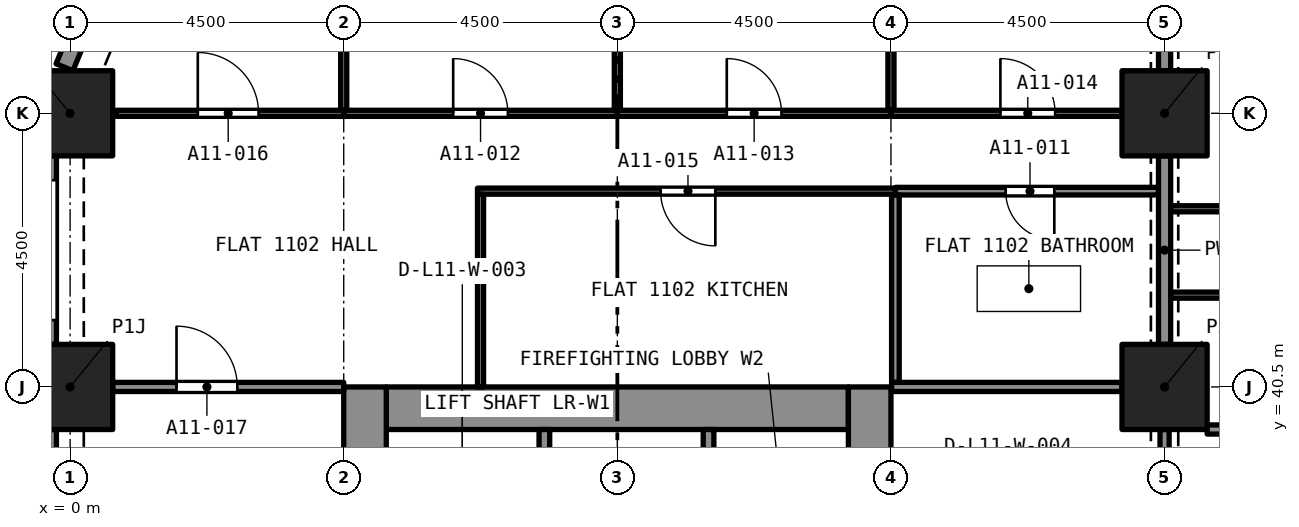
"""IFC4 building model, lengths in metres.
Left out: names, types, materials, properties, quantities, classifications, styles, units other than length and angle.
Written with IfcOpenShell. Run it as: python <this file> out.ifc"""

import sys

from ifc_helpers import new_model, si_unit, direction, frame, frame_2d, origin, origin_2d, place, context, subcontext, project, spatial, rectangle, extrude, element, fill, save


model = new_model("IFC4")
c1 = context("Model", 3, precision=1e-05, world=origin(), true_north=direction((0.0, 1.0)))
c2 = subcontext(c1, "Body", "Model", "MODEL_VIEW")
j1 = project(units=[si_unit("LENGTHUNIT", "METRE"), si_unit("PLANEANGLEUNIT", "RADIAN")], contexts=[c1])
p1 = place(None, origin())
s1 = spatial("IfcSite", under=j1, at=p1, CompositionType="ELEMENT")
p2 = place(p1, origin())
s2 = spatial("IfcBuilding", under=s1, at=p2, CompositionType="ELEMENT")
p3 = place(p2, frame((0.0, 0.0, 46.4)))
s3 = spatial("IfcBuildingStorey", under=s2, at=p3, CompositionType="ELEMENT", Elevation=46.4)
for number, where, z_axis, x_axis in (
    (1, (0.0, 40.5, 0.0), (0.0, 0.0, 1.0), (1.0, 0.0, 0.0)),
    (2, (18.0, 40.5, 0.0), (0.0, 0.0, 1.0), (1.0, 0.0, 0.0)),
    (3, (0.0, 45.0, 0.0), (0.0, 0.0, 1.0), (1.0, 0.0, 0.0)),
    (4, (18.0, 45.0, 0.0), (0.0, 0.0, 1.0), (1.0, 0.0, 0.0)),
):
    element("IfcColumn", number, at=place(p3, frame(where, z_axis=z_axis, x_axis=x_axis)), inside=s3, PredefinedType="COLUMN", context=c2, shape_type="SweptSolid", body=[
        extrude(rectangle(XDim=1.4, YDim=1.4, at=origin_2d()), origin(), (0.0, 0.0, 1.0), 3.2),
    ])
p4 = place(p3, frame((5.2, 40.15, 0.0), z_axis=(0.0, 0.0, 1.0), x_axis=(1.0, 0.0, 0.0)))
e5 = element("IfcWall", 5, at=p4, inside=s3, PredefinedType="SOLIDWALL", context=c2, shape_type="SweptSolid", body=[
    extrude(rectangle(XDim=7.6, YDim=0.7, at=frame_2d((3.8, 0.0))), origin(), (0.0, 0.0, 1.0), 3.2),
])
p5 = place(p3, frame((4.85, 27.0, 0.0), z_axis=(0.0, 0.0, 1.0), x_axis=(0.0, 1.0, 0.0)))
e6 = element("IfcWall", 6, at=p5, inside=s3, PredefinedType="SOLIDWALL", context=c2, shape_type="SweptSolid", body=[
    extrude(rectangle(XDim=13.5, YDim=0.7, at=frame_2d((6.75, 0.0))), origin(), (0.0, 0.0, 1.0), 3.2),
])
p6 = place(p5, frame((8.95, 0.0, 0.0)))
e7 = element("IfcOpeningElement", 7, at=p6, cuts=e6, PredefinedType="OPENING", context=c2, shape_type="SweptSolid", body=[
    extrude(rectangle(XDim=1.2, YDim=2.1, at=frame_2d((0.6, 1.05))), frame((0.0, 0.36, 0.0), z_axis=(0.0, -1.0, 0.0), x_axis=(1.0, 0.0, 0.0)), (0.0, 0.0, 1.0), 0.72),
])
p7 = place(p3, frame((13.15, 27.0, 0.0), z_axis=(0.0, 0.0, 1.0), x_axis=(0.0, 1.0, 0.0)))
e8 = element("IfcWall", 8, at=p7, inside=s3, PredefinedType="SOLIDWALL", context=c2, shape_type="SweptSolid", body=[
    extrude(rectangle(XDim=13.5, YDim=0.7, at=frame_2d((6.75, 0.0))), origin(), (0.0, 0.0, 1.0), 3.2),
])
p8 = place(p7, frame((11.1, 0.0, 0.0)))
e9 = element("IfcOpeningElement", 9, at=p8, cuts=e8, PredefinedType="OPENING", context=c2, shape_type="SweptSolid", body=[
    extrude(rectangle(XDim=1.1, YDim=2.1, at=frame_2d((0.55, 1.05))), frame((0.0, 0.36, 0.0), z_axis=(0.0, -1.0, 0.0), x_axis=(1.0, 0.0, 0.0)), (0.0, 0.0, 1.0), 0.72),
])
p9 = place(p7, frame((8.95, 0.0, 0.0)))
e10 = element("IfcOpeningElement", 10, at=p9, cuts=e8, PredefinedType="OPENING", context=c2, shape_type="SweptSolid", body=[
    extrude(rectangle(XDim=1.2, YDim=2.1, at=frame_2d((0.6, 1.05))), frame((0.0, 0.36, 0.0), z_axis=(0.0, -1.0, 0.0), x_axis=(1.0, 0.0, 0.0)), (0.0, 0.0, 1.0), 0.72),
])
p10 = place(p3, frame((-0.092, 45.757, 0.0), z_axis=(0.0, 0.0, 1.0), x_axis=(0.382737135771, 0.923857286003, 0.0)))
e11 = element("IfcWall", 11, at=p10, inside=s3, PredefinedType="SOLIDWALL", context=c2, shape_type="SweptSolid", body=[
    extrude(rectangle(XDim=1.865, YDim=0.3, at=frame_2d((0.933, 0.0))), origin(), (0.0, 0.0, 1.0), 3.2),
])
p11 = place(p10, frame((0.508, 0.0, 0.45)))
e12 = element("IfcOpeningElement", 12, at=p11, cuts=e11, PredefinedType="OPENING", context=c2, shape_type="SweptSolid", body=[
    extrude(rectangle(XDim=1.1, YDim=1.95, at=frame_2d((0.55, 0.975))), frame((0.0, 0.16, 0.0), z_axis=(0.0, -1.0, 0.0), x_axis=(1.0, 0.0, 0.0)), (0.0, 0.0, 1.0), 0.32),
])
p12 = place(p3, frame((-0.375, 41.2, 0.0), z_axis=(0.0, 0.0, 1.0), x_axis=(0.0, 1.0, 0.0)))
e13 = element("IfcWall", 13, at=p12, inside=s3, PredefinedType="SOLIDWALL", context=c2, shape_type="SweptSolid", body=[
    extrude(rectangle(XDim=3.1, YDim=0.3, at=frame_2d((1.55, 0.0))), origin(), (0.0, 0.0, 1.0), 3.2),
])
p13 = place(p12, frame((0.4, 0.0, 0.45)))
e14 = element("IfcOpeningElement", 14, at=p13, cuts=e13, PredefinedType="OPENING", context=c2, shape_type="SweptSolid", body=[
    extrude(rectangle(XDim=2.3, YDim=1.95, at=frame_2d((1.15, 0.975))), frame((0.0, 0.16, 0.0), z_axis=(0.0, -1.0, 0.0), x_axis=(1.0, 0.0, 0.0)), (0.0, 0.0, 1.0), 0.32),
])
p14 = place(p3, frame((-0.375, 36.7, 0.0), z_axis=(0.0, 0.0, 1.0), x_axis=(0.0, 1.0, 0.0)))
e15 = element("IfcWall", 15, at=p14, inside=s3, PredefinedType="SOLIDWALL", context=c2, shape_type="SweptSolid", body=[
    extrude(rectangle(XDim=3.1, YDim=0.3, at=frame_2d((1.55, 0.0))), origin(), (0.0, 0.0, 1.0), 3.2),
])
p15 = place(p14, frame((0.4, 0.0, 0.45)))
e16 = element("IfcOpeningElement", 16, at=p15, cuts=e15, PredefinedType="OPENING", context=c2, shape_type="SweptSolid", body=[
    extrude(rectangle(XDim=2.3, YDim=1.95, at=frame_2d((1.15, 0.975))), frame((0.0, 0.16, 0.0), z_axis=(0.0, -1.0, 0.0), x_axis=(1.0, 0.0, 0.0)), (0.0, 0.0, 1.0), 0.32),
])
p16 = place(p3, frame((17.9, 43.72, 0.0), z_axis=(0.0, 0.0, 1.0), x_axis=(-1.0, 0.0, 0.0)))
e17 = element("IfcWall", 17, at=p16, inside=s3, PredefinedType="PARTITIONING", context=c2, shape_type="SweptSolid", body=[
    extrude(rectangle(XDim=4.327, YDim=0.125, at=frame_2d((2.163, 0.0))), origin(), (0.0, 0.0, 1.0), 2.9),
])
p17 = place(p16, frame((1.713, 0.0, 0.0)))
e18 = element("IfcOpeningElement", 18, at=p17, cuts=e17, PredefinedType="OPENING", context=c2, shape_type="SweptSolid", body=[
    extrude(rectangle(XDim=0.8, YDim=2.1, at=frame_2d((0.4, 1.05))), frame((0.0, 0.073, 0.0), z_axis=(0.0, -1.0, 0.0), x_axis=(1.0, 0.0, 0.0)), (0.0, 0.0, 1.0), 0.145),
])
p18 = place(p3, frame((13.573, 40.575, 0.0), z_axis=(0.0, 0.0, 1.0), x_axis=(0.0, 1.0, 0.0)))
e19 = element("IfcWall", 19, at=p18, inside=s3, PredefinedType="PARTITIONING", context=c2, shape_type="SweptSolid", body=[
    extrude(rectangle(XDim=3.083, YDim=0.125, at=frame_2d((1.541, 0.0))), origin(), (0.0, 0.0, 1.0), 2.9),
])
p19 = place(p3, frame((18.0, 41.2, 0.0), z_axis=(0.0, 0.0, 1.0), x_axis=(0.0, 1.0, 0.0)))
e20 = element("IfcWall", 20, at=p19, inside=s3, PredefinedType="PARTITIONING", context=c2, shape_type="SweptSolid", body=[
    extrude(rectangle(XDim=3.1, YDim=0.2, at=frame_2d((1.55, 0.0))), origin(), (0.0, 0.0, 1.0), 2.38),
])
p20 = place(p3, frame((13.511, 40.5, 0.0), z_axis=(0.0, 0.0, 1.0), x_axis=(1.0, 0.0, 0.0)))
e21 = element("IfcWall", 21, at=p20, inside=s3, PredefinedType="PARTITIONING", context=c2, shape_type="SweptSolid", body=[
    extrude(rectangle(XDim=3.789, YDim=0.15, at=frame_2d((1.895, 0.0))), origin(), (0.0, 0.0, 1.0), 2.9),
])
p21 = place(p3, frame((9.0, 45.05, 0.0), z_axis=(0.0, 0.0, 1.0), x_axis=(0.0, 1.0, 0.0)))
e22 = element("IfcWall", 22, at=p21, inside=s3, PredefinedType="PARTITIONING", context=c2, shape_type="SweptSolid", body=[
    extrude(rectangle(XDim=3.75, YDim=0.1, at=frame_2d((1.875, 0.0))), origin(), (0.0, 0.0, 1.0), 2.9),
])
p22 = place(p3, frame((4.5, 45.0, 0.0), z_axis=(0.0, 0.0, 1.0), x_axis=(1.0, 0.0, 0.0)))
e23 = element("IfcWall", 23, at=p22, inside=s3, PredefinedType="PARTITIONING", context=c2, shape_type="SweptSolid", body=[
    extrude(rectangle(XDim=4.5, YDim=0.1, at=frame_2d((2.25, 0.0))), origin(), (0.0, 0.0, 1.0), 2.9),
])
p23 = place(p22, frame((1.8, 0.0, 0.0)))
e24 = element("IfcOpeningElement", 24, at=p23, cuts=e23, PredefinedType="OPENING", context=c2, shape_type="SweptSolid", body=[
    extrude(rectangle(XDim=0.9, YDim=2.1, at=frame_2d((0.45, 1.05))), frame((0.0, 0.06, 0.0), z_axis=(0.0, -1.0, 0.0), x_axis=(1.0, 0.0, 0.0)), (0.0, 0.0, 1.0), 0.12),
])
p24 = place(p3, frame((4.5, 45.05, 0.0), z_axis=(0.0, 0.0, 1.0), x_axis=(0.0, 1.0, 0.0)))
e25 = element("IfcWall", 25, at=p24, inside=s3, PredefinedType="PARTITIONING", context=c2, shape_type="SweptSolid", body=[
    extrude(rectangle(XDim=3.692, YDim=0.1, at=frame_2d((1.846, 0.0))), origin(), (0.0, 0.0, 1.0), 2.9),
])
p25 = place(p3, frame((13.5, 45.05, 0.0), z_axis=(0.0, 0.0, 1.0), x_axis=(0.0, 1.0, 0.0)))
e26 = element("IfcWall", 26, at=p25, inside=s3, PredefinedType="PARTITIONING", context=c2, shape_type="SweptSolid", body=[
    extrude(rectangle(XDim=3.75, YDim=0.1, at=frame_2d((1.875, 0.0))), origin(), (0.0, 0.0, 1.0), 2.9),
])
p26 = place(p3, frame((9.0, 45.0, 0.0), z_axis=(0.0, 0.0, 1.0), x_axis=(1.0, 0.0, 0.0)))
e27 = element("IfcWall", 27, at=p26, inside=s3, PredefinedType="PARTITIONING", context=c2, shape_type="SweptSolid", body=[
    extrude(rectangle(XDim=4.5, YDim=0.1, at=frame_2d((2.25, 0.0))), origin(), (0.0, 0.0, 1.0), 2.9),
])
p27 = place(p26, frame((1.8, 0.0, 0.0)))
e28 = element("IfcOpeningElement", 28, at=p27, cuts=e27, PredefinedType="OPENING", context=c2, shape_type="SweptSolid", body=[
    extrude(rectangle(XDim=0.9, YDim=2.1, at=frame_2d((0.45, 1.05))), frame((0.0, 0.06, 0.0), z_axis=(0.0, -1.0, 0.0), x_axis=(1.0, 0.0, 0.0)), (0.0, 0.0, 1.0), 0.12),
])
p28 = place(p3, frame((13.5, 45.0, 0.0), z_axis=(0.0, 0.0, 1.0), x_axis=(1.0, 0.0, 0.0)))
e29 = element("IfcWall", 29, at=p28, inside=s3, PredefinedType="PARTITIONING", context=c2, shape_type="SweptSolid", body=[
    extrude(rectangle(XDim=3.8, YDim=0.1, at=frame_2d((1.9, 0.0))), origin(), (0.0, 0.0, 1.0), 2.9),
])
p29 = place(p28, frame((1.8, 0.0, 0.0)))
e30 = element("IfcOpeningElement", 30, at=p29, cuts=e29, PredefinedType="OPENING", context=c2, shape_type="SweptSolid", body=[
    extrude(rectangle(XDim=0.9, YDim=2.1, at=frame_2d((0.45, 1.05))), frame((0.0, 0.06, 0.0), z_axis=(0.0, -1.0, 0.0), x_axis=(1.0, 0.0, 0.0)), (0.0, 0.0, 1.0), 0.12),
])
p30 = place(p3, frame((18.0, 45.7, 0.0), z_axis=(0.0, 0.0, 1.0), x_axis=(0.0, 1.0, 0.0)))
e31 = element("IfcWall", 31, at=p30, inside=s3, PredefinedType="PARTITIONING", context=c2, shape_type="SweptSolid", body=[
    extrude(rectangle(XDim=3.1, YDim=0.2, at=frame_2d((1.55, 0.0))), origin(), (0.0, 0.0, 1.0), 2.38),
])
p31 = place(p3, frame((13.573, 43.72, 0.0), z_axis=(0.0, 0.0, 1.0), x_axis=(-1.0, 0.0, 0.0)))
e32 = element("IfcWall", 32, at=p31, inside=s3, PredefinedType="PARTITIONING", context=c2, shape_type="SweptSolid", body=[
    extrude(rectangle(XDim=6.873, YDim=0.1, at=frame_2d((3.437, 0.0))), origin(), (0.0, 0.0, 1.0), 2.9),
])
p32 = place(p31, frame((2.962, 0.0, 0.0)))
e33 = element("IfcOpeningElement", 33, at=p32, cuts=e32, PredefinedType="OPENING", context=c2, shape_type="SweptSolid", body=[
    extrude(rectangle(XDim=0.9, YDim=2.1, at=frame_2d((0.45, 1.05))), frame((0.0, 0.06, 0.0), z_axis=(0.0, -1.0, 0.0), x_axis=(1.0, 0.0, 0.0)), (0.0, 0.0, 1.0), 0.12),
])
p33 = place(p3, frame((6.75, 40.5, 0.0), z_axis=(0.0, 0.0, 1.0), x_axis=(0.0, 1.0, 0.0)))
e34 = element("IfcWall", 34, at=p33, inside=s3, PredefinedType="PARTITIONING", context=c2, shape_type="SweptSolid", body=[
    extrude(rectangle(XDim=3.17, YDim=0.1, at=frame_2d((1.585, 0.0))), origin(), (0.0, 0.0, 1.0), 2.9),
])
p34 = place(p3, frame((0.758, 45.0, 0.0), z_axis=(0.0, 0.0, 1.0), x_axis=(1.0, 0.0, 0.0)))
e35 = element("IfcWall", 35, at=p34, inside=s3, PredefinedType="PARTITIONING", context=c2, shape_type="SweptSolid", body=[
    extrude(rectangle(XDim=3.742, YDim=0.1, at=frame_2d((1.871, 0.0))), origin(), (0.0, 0.0, 1.0), 2.9),
])
p35 = place(p34, frame((1.342, 0.0, 0.0)))
e36 = element("IfcOpeningElement", 36, at=p35, cuts=e35, PredefinedType="OPENING", context=c2, shape_type="SweptSolid", body=[
    extrude(rectangle(XDim=1.0, YDim=2.1, at=frame_2d((0.5, 1.05))), frame((0.0, 0.06, 0.0), z_axis=(0.0, -1.0, 0.0), x_axis=(1.0, 0.0, 0.0)), (0.0, 0.0, 1.0), 0.12),
])
p36 = place(p3, frame((0.7, 40.5, 0.0), z_axis=(0.0, 0.0, 1.0), x_axis=(1.0, 0.0, 0.0)))
e37 = element("IfcWall", 37, at=p36, inside=s3, PredefinedType="PARTITIONING", context=c2, shape_type="SweptSolid", body=[
    extrude(rectangle(XDim=3.8, YDim=0.15, at=frame_2d((1.9, 0.0))), origin(), (0.0, 0.0, 1.0), 2.9),
])
p37 = place(p36, frame((1.05, 0.0, 0.0)))
e38 = element("IfcOpeningElement", 38, at=p37, cuts=e37, PredefinedType="OPENING", context=c2, shape_type="SweptSolid", body=[
    extrude(rectangle(XDim=1.0, YDim=2.1, at=frame_2d((0.5, 1.05))), frame((0.0, 0.085, 0.0), z_axis=(0.0, -1.0, 0.0), x_axis=(1.0, 0.0, 0.0)), (0.0, 0.0, 1.0), 0.17),
])
p38 = place(p3, frame((27.425, 42.01, 0.0), z_axis=(0.0, 0.0, 1.0), x_axis=(-1.0, 0.0, 0.0)))
e39 = element("IfcWall", 39, at=p38, inside=s3, PredefinedType="PARTITIONING", context=c2, shape_type="SweptSolid", body=[
    extrude(rectangle(XDim=9.325, YDim=0.1, at=frame_2d((4.663, 0.0))), origin(), (0.0, 0.0, 1.0), 2.75),
])
p39 = place(p38, frame((4.288, 0.0, 0.0)))
e40 = element("IfcOpeningElement", 40, at=p39, cuts=e39, PredefinedType="OPENING", context=c2, shape_type="SweptSolid", body=[
    extrude(rectangle(XDim=0.9, YDim=2.1, at=frame_2d((0.45, 1.05))), frame((0.0, 0.06, 0.0), z_axis=(0.0, -1.0, 0.0), x_axis=(1.0, 0.0, 0.0)), (0.0, 0.0, 1.0), 0.12),
])
p40 = place(p3, frame((18.1, 43.43, 0.0), z_axis=(0.0, 0.0, 1.0), x_axis=(1.0, 0.0, 0.0)))
e41 = element("IfcWall", 41, at=p40, inside=s3, PredefinedType="PARTITIONING", context=c2, shape_type="SweptSolid", body=[
    extrude(rectangle(XDim=4.4, YDim=0.1, at=frame_2d((2.2, 0.0))), origin(), (0.0, 0.0, 1.0), 2.75),
])
p41 = place(p40, frame((1.65, 0.0, 0.0)))
e42 = element("IfcOpeningElement", 42, at=p41, cuts=e41, PredefinedType="OPENING", context=c2, shape_type="SweptSolid", body=[
    extrude(rectangle(XDim=1.0, YDim=2.1, at=frame_2d((0.5, 1.05))), frame((0.0, 0.06, 0.0), z_axis=(0.0, -1.0, 0.0), x_axis=(1.0, 0.0, 0.0)), (0.0, 0.0, 1.0), 0.12),
])
p42 = place(p3, frame((18.7, 39.8, 0.0), z_axis=(0.0, 0.0, 1.0), x_axis=(1.0, 0.0, 0.0)))
e43 = element("IfcWall", 43, at=p42, inside=s3, PredefinedType="PARTITIONING", context=c2, shape_type="SweptSolid", body=[
    extrude(rectangle(XDim=8.675, YDim=0.15, at=frame_2d((4.337, 0.0))), origin(), (0.0, 0.0, 1.0), 2.75),
])
p43 = place(p3, frame((18.0, 39.8, 0.0), z_axis=(0.0, 0.0, 1.0), x_axis=(0.0, -1.0, 0.0)))
e44 = element("IfcWall", 44, at=p43, inside=s3, PredefinedType="PARTITIONING", context=c2, shape_type="SweptSolid", body=[
    extrude(rectangle(XDim=3.1, YDim=0.15, at=frame_2d((1.55, 0.0))), origin(), (0.0, 0.0, 1.0), 2.38),
])
p44 = place(p43, frame((0.95, 0.0, 0.0)))
e45 = element("IfcOpeningElement", 45, at=p44, cuts=e44, PredefinedType="OPENING", context=c2, shape_type="SweptSolid", body=[
    extrude(rectangle(XDim=1.2, YDim=2.1, at=frame_2d((0.6, 1.05))), frame((0.0, 0.085, 0.0), z_axis=(0.0, -1.0, 0.0), x_axis=(1.0, 0.0, 0.0)), (0.0, 0.0, 1.0), 0.17),
])
p45 = place(p3, frame((7.8, 37.5, 0.0), z_axis=(0.0, 0.0, 1.0), x_axis=(0.0, 1.0, 0.0)))
e46 = element("IfcWall", 46, at=p45, inside=s3, PredefinedType="SOLIDWALL", context=c2, shape_type="SweptSolid", body=[
    extrude(rectangle(XDim=2.3, YDim=0.175, at=frame_2d((1.15, 0.0))), origin(), (0.0, 0.0, 1.0), 2.9),
])
p46 = place(p3, frame((10.5, 37.5, 0.0), z_axis=(0.0, 0.0, 1.0), x_axis=(0.0, 1.0, 0.0)))
e47 = element("IfcWall", 47, at=p46, inside=s3, PredefinedType="SOLIDWALL", context=c2, shape_type="SweptSolid", body=[
    extrude(rectangle(XDim=2.3, YDim=0.175, at=frame_2d((1.15, 0.0))), origin(), (0.0, 0.0, 1.0), 2.9),
])
p47 = place(p46, frame((0.65, 0.0, 0.0)))
e48 = element("IfcOpeningElement", 48, at=p47, cuts=e47, PredefinedType="OPENING", context=c2, shape_type="SweptSolid", body=[
    extrude(rectangle(XDim=1.0, YDim=2.1, at=frame_2d((0.5, 1.05))), frame((0.0, 0.097, 0.0), z_axis=(0.0, -1.0, 0.0), x_axis=(1.0, 0.0, 0.0)), (0.0, 0.0, 1.0), 0.195),
])
p48 = place(p17, origin())
e49 = element("IfcDoor", 49, at=p48, inside=s3, OperationType="SINGLE_SWING_LEFT", PredefinedType="DOOR", context=c2, shape_type="SweptSolid", body=[
    extrude(rectangle(XDim=0.8, YDim=2.1, at=frame_2d((0.4, 1.05))), frame((0.0, 0.025, 0.0), z_axis=(0.0, -1.0, 0.0), x_axis=(1.0, 0.0, 0.0)), (0.0, 0.0, 1.0), 0.05),
])
fill(e18, e49)
p49 = place(p23, origin())
e50 = element("IfcDoor", 50, at=p49, inside=s3, OperationType="SINGLE_SWING_RIGHT", PredefinedType="DOOR", context=c2, shape_type="SweptSolid", body=[
    extrude(rectangle(XDim=0.9, YDim=2.1, at=frame_2d((0.45, 1.05))), frame((0.0, 0.025, 0.0), z_axis=(0.0, -1.0, 0.0), x_axis=(1.0, 0.0, 0.0)), (0.0, 0.0, 1.0), 0.05),
])
fill(e24, e50)
p50 = place(p27, origin())
e51 = element("IfcDoor", 51, at=p50, inside=s3, OperationType="SINGLE_SWING_LEFT", PredefinedType="DOOR", context=c2, shape_type="SweptSolid", body=[
    extrude(rectangle(XDim=0.9, YDim=2.1, at=frame_2d((0.45, 1.05))), frame((0.0, 0.025, 0.0), z_axis=(0.0, -1.0, 0.0), x_axis=(1.0, 0.0, 0.0)), (0.0, 0.0, 1.0), 0.05),
])
fill(e28, e51)
p51 = place(p29, origin())
e52 = element("IfcDoor", 52, at=p51, inside=s3, OperationType="SINGLE_SWING_RIGHT", PredefinedType="DOOR", context=c2, shape_type="SweptSolid", body=[
    extrude(rectangle(XDim=0.9, YDim=2.1, at=frame_2d((0.45, 1.05))), frame((0.0, 0.025, 0.0), z_axis=(0.0, -1.0, 0.0), x_axis=(1.0, 0.0, 0.0)), (0.0, 0.0, 1.0), 0.05),
])
fill(e30, e52)
p52 = place(p32, origin())
e53 = element("IfcDoor", 53, at=p52, inside=s3, OperationType="SINGLE_SWING_LEFT", PredefinedType="DOOR", context=c2, shape_type="SweptSolid", body=[
    extrude(rectangle(XDim=0.9, YDim=2.1, at=frame_2d((0.45, 1.05))), frame((0.0, 0.025, 0.0), z_axis=(0.0, -1.0, 0.0), x_axis=(1.0, 0.0, 0.0)), (0.0, 0.0, 1.0), 0.05),
])
fill(e33, e53)
p53 = place(p35, origin())
e54 = element("IfcDoor", 54, at=p53, inside=s3, OperationType="SINGLE_SWING_LEFT", PredefinedType="DOOR", context=c2, shape_type="SweptSolid", body=[
    extrude(rectangle(XDim=1.0, YDim=2.1, at=frame_2d((0.5, 1.05))), frame((0.0, 0.025, 0.0), z_axis=(0.0, -1.0, 0.0), x_axis=(1.0, 0.0, 0.0)), (0.0, 0.0, 1.0), 0.05),
])
fill(e36, e54)
p54 = place(p37, origin())
e55 = element("IfcDoor", 55, at=p54, inside=s3, OperationType="SINGLE_SWING_LEFT", PredefinedType="DOOR", context=c2, shape_type="SweptSolid", body=[
    extrude(rectangle(XDim=1.0, YDim=2.1, at=frame_2d((0.5, 1.05))), frame((0.0, 0.025, 0.0), z_axis=(0.0, -1.0, 0.0), x_axis=(1.0, 0.0, 0.0)), (0.0, 0.0, 1.0), 0.05),
])
fill(e38, e55)
save(model, sys.argv[1])
